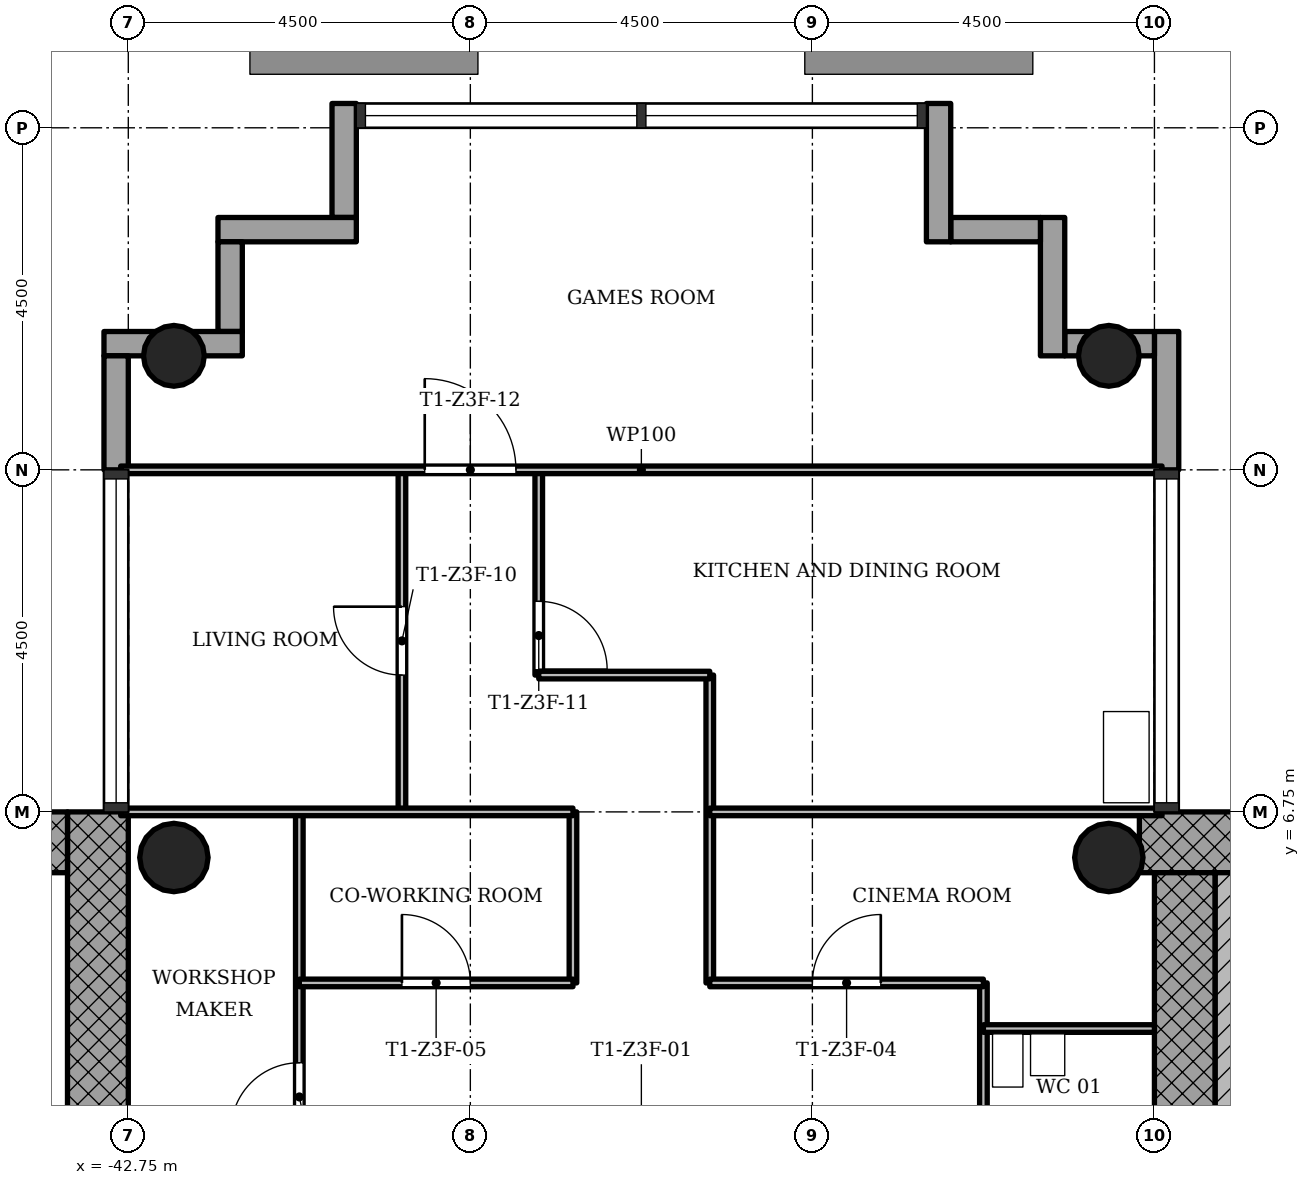
"""IFC4 building model, lengths in metres.
Left out: names, types, materials, properties, quantities, classifications, styles, units other than length and angle.
Written with IfcOpenShell. Run it as: python <this file> out.ifc"""

import sys

from ifc_helpers import new_model, si_unit, direction, frame, frame_2d, origin, origin_2d, place, context, subcontext, project, spatial, rectangle, hollow_circle, extrude, element, fill, save


model = new_model("IFC4")
c1 = context("Model", 3, precision=1e-05, world=origin(), true_north=direction((0.0, 1.0)))
c2 = subcontext(c1, "Body", "Model", "MODEL_VIEW")
j1 = project(units=[si_unit("LENGTHUNIT", "METRE"), si_unit("PLANEANGLEUNIT", "RADIAN")], contexts=[c1])
p1 = place(None, origin())
s1 = spatial("IfcSite", under=j1, at=p1, CompositionType="ELEMENT")
p2 = place(p1, origin())
s2 = spatial("IfcBuilding", under=s1, at=p2, CompositionType="ELEMENT")
p3 = place(p2, frame((0.0, 0.0, 164.3)))
s3 = spatial("IfcBuildingStorey", under=s2, at=p3, CompositionType="ELEMENT", Elevation=164.3)
p4 = place(p3, frame((-20.652, 6.35, 0.0), z_axis=(0.0, 0.0, 1.0), x_axis=(-1.0, 0.0, 0.0)))
e1 = element("IfcWall", 1, at=p4, inside=s3, PredefinedType="SHEAR", context=c2, shape_type="SweptSolid", body=[
    extrude(rectangle(XDim=8.796, YDim=0.8, at=frame_2d((4.398, 0.0))), origin(), (0.0, 0.0, 1.0), 3.4),
])
p5 = place(p3, frame((-28.85, 5.95, 0.0), z_axis=(0.0, 0.0, 1.0), x_axis=(0.0, -1.0, 0.0)))
e2 = element("IfcWall", 2, at=p5, inside=s3, PredefinedType="SHEAR", context=c2, shape_type="SweptSolid", body=[
    extrude(rectangle(XDim=12.7, YDim=0.8, at=frame_2d((6.35, 0.0))), origin(), (0.0, 0.0, 1.0), 3.4),
])
p6 = place(p5, frame((5.05, 0.0, 0.0)))
e3 = element("IfcOpeningElement", 3, at=p6, cuts=e2, PredefinedType="OPENING", context=c2, shape_type="SweptSolid", body=[
    extrude(rectangle(XDim=1.8, YDim=2.1, at=frame_2d((0.9, 1.05))), frame((0.0, 0.41, 0.0), z_axis=(0.0, -1.0, 0.0), x_axis=(1.0, 0.0, 0.0)), (0.0, 0.0, 1.0), 0.82),
])
p7 = place(p3, frame((-43.15, -5.95, 0.0), z_axis=(0.0, 0.0, 1.0), x_axis=(0.0, 1.0, 0.0)))
e4 = element("IfcWall", 4, at=p7, inside=s3, PredefinedType="SHEAR", context=c2, shape_type="SweptSolid", body=[
    extrude(rectangle(XDim=12.7, YDim=0.8, at=frame_2d((6.35, 0.0))), origin(), (0.0, 0.0, 1.0), 3.4),
])
p8 = place(p7, frame((5.05, 0.0, 0.0)))
e5 = element("IfcOpeningElement", 5, at=p8, cuts=e4, PredefinedType="OPENING", context=c2, shape_type="SweptSolid", body=[
    extrude(rectangle(XDim=1.8, YDim=2.1, at=frame_2d((0.9, 1.05))), frame((0.0, 0.41, 0.0), z_axis=(0.0, -1.0, 0.0), x_axis=(1.0, 0.0, 0.0)), (0.0, 0.0, 1.0), 0.82),
])
p9 = place(p3, frame((-43.55, 6.35, 0.0), z_axis=(0.0, 0.0, 1.0), x_axis=(-1.0, 0.0, 0.0)))
e6 = element("IfcWall", 6, at=p9, inside=s3, PredefinedType="SHEAR", context=c2, shape_type="SweptSolid", body=[
    extrude(rectangle(XDim=8.2, YDim=0.8, at=frame_2d((4.1, 0.0))), origin(), (0.0, 0.0, 1.0), 3.4),
])
for number, where, z_axis, x_axis in (
    (7, (-29.85, 12.75, 0.0), (0.0, 0.0, 1.0), (1.0, 0.0, 0.0)),
    (8, (-42.15, 12.75, 0.0), (0.0, 0.0, 1.0), (1.0, 0.0, 0.0)),
):
    element("IfcColumn", number, at=place(p3, frame(where, z_axis=z_axis, x_axis=x_axis)), inside=s3, PredefinedType="COLUMN", context=c2, shape_type="SweptSolid", body=[
        extrude(hollow_circle(Radius=0.4, WallThickness=0.028, at=origin_2d()), origin(), (0.0, 0.0, 1.0), 3.4),
    ])
for number, where, z_axis, x_axis in (
    (9, (-29.85, 6.15, 0.0), (0.0, 0.0, 1.0), (1.0, 0.0, 0.0)),
    (10, (-42.15, 6.15, 0.0), (0.0, 0.0, 1.0), (1.0, 0.0, 0.0)),
):
    element("IfcColumn", number, at=place(p3, frame(where, z_axis=z_axis, x_axis=x_axis)), inside=s3, PredefinedType="COLUMN", context=c2, shape_type="SweptSolid", body=[
        extrude(hollow_circle(Radius=0.45, WallThickness=0.032, at=origin_2d()), origin(), (0.0, 0.0, 1.0), 3.4),
    ])
p10 = place(p3, frame((-29.09, 11.25, -0.3), z_axis=(0.0, 0.0, 1.0), x_axis=(0.0, 1.0, 0.0)))
e11 = element("IfcWall", 11, at=p10, inside=s3, PredefinedType="STANDARD", context=c2, shape_type="SweptSolid", body=[
    extrude(rectangle(XDim=1.82, YDim=0.32, at=frame_2d((0.91, 0.0))), origin(), (0.0, 0.0, 1.0), 3.4),
])
p11 = place(p3, frame((-29.25, 12.91, -0.3), z_axis=(0.0, 0.0, 1.0), x_axis=(-1.0, 0.0, 0.0)))
e12 = element("IfcWall", 12, at=p11, inside=s3, PredefinedType="STANDARD", context=c2, shape_type="SweptSolid", body=[
    extrude(rectangle(XDim=1.18, YDim=0.32, at=frame_2d((0.59, 0.0))), origin(), (0.0, 0.0, 1.0), 3.4),
])
p12 = place(p3, frame((-30.59, 12.75, -0.3), z_axis=(0.0, 0.0, 1.0), x_axis=(0.0, 1.0, 0.0)))
e13 = element("IfcWall", 13, at=p12, inside=s3, PredefinedType="STANDARD", context=c2, shape_type="SweptSolid", body=[
    extrude(rectangle(XDim=1.82, YDim=0.32, at=frame_2d((0.91, 0.0))), origin(), (0.0, 0.0, 1.0), 3.4),
])
p13 = place(p3, frame((-30.75, 14.41, -0.3), z_axis=(0.0, 0.0, 1.0), x_axis=(-1.0, 0.0, 0.0)))
e14 = element("IfcWall", 14, at=p13, inside=s3, PredefinedType="STANDARD", context=c2, shape_type="SweptSolid", body=[
    extrude(rectangle(XDim=1.18, YDim=0.32, at=frame_2d((0.59, 0.0))), origin(), (0.0, 0.0, 1.0), 3.4),
])
p14 = place(p3, frame((-32.09, 14.25, -0.3), z_axis=(0.0, 0.0, 1.0), x_axis=(0.0, 1.0, 0.0)))
e15 = element("IfcWall", 15, at=p14, inside=s3, PredefinedType="STANDARD", context=c2, shape_type="SweptSolid", body=[
    extrude(rectangle(XDim=1.82, YDim=0.32, at=frame_2d((0.91, 0.0))), origin(), (0.0, 0.0, 1.0), 3.4),
])
p15 = place(p3, frame((-39.91, 16.07, -0.3), z_axis=(0.0, 0.0, 1.0), x_axis=(0.0, -1.0, 0.0)))
e16 = element("IfcWall", 16, at=p15, inside=s3, PredefinedType="STANDARD", context=c2, shape_type="SweptSolid", body=[
    extrude(rectangle(XDim=1.5, YDim=0.32, at=frame_2d((0.75, 0.0))), origin(), (0.0, 0.0, 1.0), 3.4),
])
p16 = place(p3, frame((-39.75, 14.41, -0.3), z_axis=(0.0, 0.0, 1.0), x_axis=(-1.0, 0.0, 0.0)))
e17 = element("IfcWall", 17, at=p16, inside=s3, PredefinedType="STANDARD", context=c2, shape_type="SweptSolid", body=[
    extrude(rectangle(XDim=1.82, YDim=0.32, at=frame_2d((0.91, 0.0))), origin(), (0.0, 0.0, 1.0), 3.4),
])
p17 = place(p3, frame((-41.41, 14.25, -0.3), z_axis=(0.0, 0.0, 1.0), x_axis=(0.0, -1.0, 0.0)))
e18 = element("IfcWall", 18, at=p17, inside=s3, PredefinedType="STANDARD", context=c2, shape_type="SweptSolid", body=[
    extrude(rectangle(XDim=1.18, YDim=0.32, at=frame_2d((0.59, 0.0))), origin(), (0.0, 0.0, 1.0), 3.4),
])
p18 = place(p3, frame((-41.25, 12.91, -0.3), z_axis=(0.0, 0.0, 1.0), x_axis=(-1.0, 0.0, 0.0)))
e19 = element("IfcWall", 19, at=p18, inside=s3, PredefinedType="STANDARD", context=c2, shape_type="SweptSolid", body=[
    extrude(rectangle(XDim=1.82, YDim=0.32, at=frame_2d((0.91, 0.0))), origin(), (0.0, 0.0, 1.0), 3.4),
])
p19 = place(p3, frame((-42.91, 12.75, -0.3), z_axis=(0.0, 0.0, 1.0), x_axis=(0.0, -1.0, 0.0)))
e20 = element("IfcWall", 20, at=p19, inside=s3, PredefinedType="STANDARD", context=c2, shape_type="SweptSolid", body=[
    extrude(rectangle(XDim=1.5, YDim=0.32, at=frame_2d((0.75, 0.0))), origin(), (0.0, 0.0, 1.0), 3.4),
])
p20 = place(p3, frame((-40.5, 1.5, 0.0), z_axis=(0.0, 0.0, 1.0), x_axis=(0.0, 1.0, 0.0)))
e21 = element("IfcWall", 21, at=p20, inside=s3, PredefinedType="PARTITIONING", context=c2, shape_type="SweptSolid", body=[
    extrude(rectangle(XDim=5.25, YDim=0.1, at=frame_2d((2.625, 0.0))), origin(), (0.0, 0.0, 1.0), 3.0),
])
p21 = place(p20, frame((1.05, 0.0, 0.0)))
e22 = element("IfcOpeningElement", 22, at=p21, cuts=e21, PredefinedType="OPENING", context=c2, shape_type="SweptSolid", body=[
    extrude(rectangle(XDim=0.9, YDim=2.1, at=frame_2d((0.45, 1.05))), frame((0.0, 0.06, 0.0), z_axis=(0.0, -1.0, 0.0), x_axis=(1.0, 0.0, 0.0)), (0.0, 0.0, 1.0), 0.12),
])
p22 = place(p3, frame((-39.15, 6.75, 0.0), z_axis=(0.0, 0.0, 1.0), x_axis=(0.0, 1.0, 0.0)))
e23 = element("IfcWall", 23, at=p22, inside=s3, PredefinedType="PARTITIONING", context=c2, shape_type="SweptSolid", body=[
    extrude(rectangle(XDim=4.5, YDim=0.1, at=frame_2d((2.25, 0.0))), origin(), (0.0, 0.0, 1.0), 3.0),
])
p23 = place(p22, frame((1.8, 0.0, 0.0)))
e24 = element("IfcOpeningElement", 24, at=p23, cuts=e23, PredefinedType="OPENING", context=c2, shape_type="SweptSolid", body=[
    extrude(rectangle(XDim=0.9, YDim=2.1, at=frame_2d((0.45, 1.05))), frame((0.0, 0.06, 0.0), z_axis=(0.0, -1.0, 0.0), x_axis=(1.0, 0.0, 0.0)), (0.0, 0.0, 1.0), 0.12),
])
p24 = place(p3, frame((-37.35, 8.55, 0.0), z_axis=(0.0, 0.0, 1.0), x_axis=(0.0, 1.0, 0.0)))
e25 = element("IfcWall", 25, at=p24, inside=s3, PredefinedType="PARTITIONING", context=c2, shape_type="SweptSolid", body=[
    extrude(rectangle(XDim=2.7, YDim=0.1, at=frame_2d((1.35, 0.0))), origin(), (0.0, 0.0, 1.0), 3.0),
])
p25 = place(p24, frame((0.07, 0.0, 0.0)))
e26 = element("IfcOpeningElement", 26, at=p25, cuts=e25, PredefinedType="OPENING", context=c2, shape_type="SweptSolid", body=[
    extrude(rectangle(XDim=0.9, YDim=2.1, at=frame_2d((0.45, 1.05))), frame((0.0, 0.06, 0.0), z_axis=(0.0, -1.0, 0.0), x_axis=(1.0, 0.0, 0.0)), (0.0, 0.0, 1.0), 0.12),
])
p26 = place(p3, frame((-36.9, 4.5, 0.0), z_axis=(0.0, 0.0, 1.0), x_axis=(0.0, 1.0, 0.0)))
e27 = element("IfcWall", 27, at=p26, inside=s3, PredefinedType="PARTITIONING", context=c2, shape_type="SweptSolid", body=[
    extrude(rectangle(XDim=2.25, YDim=0.1, at=frame_2d((1.125, 0.0))), origin(), (0.0, 0.0, 1.0), 3.0),
])
p27 = place(p3, frame((-35.1, 4.5, 0.0), z_axis=(0.0, 0.0, 1.0), x_axis=(0.0, 1.0, 0.0)))
e28 = element("IfcWall", 28, at=p27, inside=s3, PredefinedType="PARTITIONING", context=c2, shape_type="SweptSolid", body=[
    extrude(rectangle(XDim=4.05, YDim=0.1, at=frame_2d((2.025, 0.0))), origin(), (0.0, 0.0, 1.0), 3.0),
])
p28 = place(p3, frame((-31.5, 1.5, 0.0), z_axis=(0.0, 0.0, 1.0), x_axis=(0.0, 1.0, 0.0)))
e29 = element("IfcWall", 29, at=p28, inside=s3, PredefinedType="PARTITIONING", context=c2, shape_type="SweptSolid", body=[
    extrude(rectangle(XDim=3.0, YDim=0.1, at=frame_2d((1.5, 0.0))), origin(), (0.0, 0.0, 1.0), 3.0),
])
p29 = place(p3, frame((-31.5, 3.9, 0.0), z_axis=(0.0, 0.0, 1.0), x_axis=(1.0, 0.0, 0.0)))
e30 = element("IfcWall", 30, at=p29, inside=s3, PredefinedType="PARTITIONING", context=c2, shape_type="SweptSolid", body=[
    extrude(rectangle(XDim=2.25, YDim=0.1, at=frame_2d((1.125, 0.0))), origin(), (0.0, 0.0, 1.0), 3.0),
])
p30 = place(p3, frame((-40.5, 4.5, 0.0), z_axis=(0.0, 0.0, 1.0), x_axis=(1.0, 0.0, 0.0)))
e31 = element("IfcWall", 31, at=p30, inside=s3, PredefinedType="PARTITIONING", context=c2, shape_type="SweptSolid", body=[
    extrude(rectangle(XDim=3.6, YDim=0.1, at=frame_2d((1.8, 0.0))), origin(), (0.0, 0.0, 1.0), 3.0),
])
p31 = place(p30, frame((1.35, 0.0, 0.0)))
e32 = element("IfcOpeningElement", 32, at=p31, cuts=e31, PredefinedType="OPENING", context=c2, shape_type="SweptSolid", body=[
    extrude(rectangle(XDim=0.9, YDim=2.1, at=frame_2d((0.45, 1.05))), frame((0.0, 0.06, 0.0), z_axis=(0.0, -1.0, 0.0), x_axis=(1.0, 0.0, 0.0)), (0.0, 0.0, 1.0), 0.12),
])
p32 = place(p3, frame((-35.1, 4.5, 0.0), z_axis=(0.0, 0.0, 1.0), x_axis=(1.0, 0.0, 0.0)))
e33 = element("IfcWall", 33, at=p32, inside=s3, PredefinedType="PARTITIONING", context=c2, shape_type="SweptSolid", body=[
    extrude(rectangle(XDim=3.6, YDim=0.1, at=frame_2d((1.8, 0.0))), origin(), (0.0, 0.0, 1.0), 3.0),
])
p33 = place(p32, frame((1.35, 0.0, 0.0)))
e34 = element("IfcOpeningElement", 34, at=p33, cuts=e33, PredefinedType="OPENING", context=c2, shape_type="SweptSolid", body=[
    extrude(rectangle(XDim=0.9, YDim=2.1, at=frame_2d((0.45, 1.05))), frame((0.0, 0.06, 0.0), z_axis=(0.0, -1.0, 0.0), x_axis=(1.0, 0.0, 0.0)), (0.0, 0.0, 1.0), 0.12),
])
for number, where, z_axis, x_axis in (
    (35, (-42.85, 6.75, 0.0), (0.0, 0.0, 1.0), (1.0, 0.0, 0.0)),
    (36, (-35.1, 6.75, 0.0), (0.0, 0.0, 1.0), (1.0, 0.0, 0.0)),
):
    element("IfcWall", number, at=place(p3, frame(where, z_axis=z_axis, x_axis=x_axis)), inside=s3, PredefinedType="PARTITIONING", context=c2, shape_type="SweptSolid", body=[
        extrude(rectangle(XDim=5.95, YDim=0.1, at=frame_2d((2.975, 0.0))), origin(), (0.0, 0.0, 1.0), 3.0),
    ])
p34 = place(p3, frame((-37.35, 8.55, 0.0), z_axis=(0.0, 0.0, 1.0), x_axis=(1.0, 0.0, 0.0)))
e37 = element("IfcWall", 37, at=p34, inside=s3, PredefinedType="PARTITIONING", context=c2, shape_type="SweptSolid", body=[
    extrude(rectangle(XDim=2.25, YDim=0.1, at=frame_2d((1.125, 0.0))), origin(), (0.0, 0.0, 1.0), 3.0),
])
p35 = place(p3, frame((-42.85, 11.25, 0.0), z_axis=(0.0, 0.0, 1.0), x_axis=(1.0, 0.0, 0.0)))
e38 = element("IfcWall", 38, at=p35, inside=s3, PredefinedType="PARTITIONING", context=c2, shape_type="SweptSolid", body=[
    extrude(rectangle(XDim=13.7, YDim=0.1, at=frame_2d((6.85, 0.0))), origin(), (0.0, 0.0, 1.0), 3.0),
])
p36 = place(p35, frame((4.0, 0.0, 0.0)))
e39 = element("IfcOpeningElement", 39, at=p36, cuts=e38, PredefinedType="OPENING", context=c2, shape_type="SweptSolid", body=[
    extrude(rectangle(XDim=1.2, YDim=2.1, at=frame_2d((0.6, 1.05))), frame((0.0, 0.06, 0.0), z_axis=(0.0, -1.0, 0.0), x_axis=(1.0, 0.0, 0.0)), (0.0, 0.0, 1.0), 0.12),
])
p37 = place(p3, frame((-28.25, 1.85, 0.0), z_axis=(0.0, 0.0, 1.0), x_axis=(0.0, 1.0, 0.0)))
e40 = element("IfcWall", 40, at=p37, inside=s3, PredefinedType="SHEAR", context=c2, shape_type="SweptSolid", body=[
    extrude(rectangle(XDim=4.1, YDim=0.4, at=frame_2d((2.05, 0.0))), origin(), (0.0, 0.0, 1.0), 3.4),
])
p38 = place(p33, origin())
e41 = element("IfcDoor", 41, at=p38, inside=s3, OperationType="SINGLE_SWING_LEFT", PredefinedType="DOOR", context=c2, shape_type="SweptSolid", body=[
    extrude(rectangle(XDim=0.9, YDim=2.1, at=frame_2d((0.45, 1.05))), frame((0.0, 0.025, 0.0), z_axis=(0.0, -1.0, 0.0), x_axis=(1.0, 0.0, 0.0)), (0.0, 0.0, 1.0), 0.05),
])
fill(e34, e41)
p39 = place(p31, origin())
e42 = element("IfcDoor", 42, at=p39, inside=s3, OperationType="SINGLE_SWING_RIGHT", PredefinedType="DOOR", context=c2, shape_type="SweptSolid", body=[
    extrude(rectangle(XDim=0.9, YDim=2.1, at=frame_2d((0.45, 1.05))), frame((0.0, 0.025, 0.0), z_axis=(0.0, -1.0, 0.0), x_axis=(1.0, 0.0, 0.0)), (0.0, 0.0, 1.0), 0.05),
])
fill(e32, e42)
p40 = place(p21, origin())
e43 = element("IfcDoor", 43, at=p40, inside=s3, OperationType="SINGLE_SWING_RIGHT", PredefinedType="DOOR", context=c2, shape_type="SweptSolid", body=[
    extrude(rectangle(XDim=0.9, YDim=2.1, at=frame_2d((0.45, 1.05))), frame((0.0, 0.025, 0.0), z_axis=(0.0, -1.0, 0.0), x_axis=(1.0, 0.0, 0.0)), (0.0, 0.0, 1.0), 0.05),
])
fill(e22, e43)
p41 = place(p23, origin())
e44 = element("IfcDoor", 44, at=p41, inside=s3, OperationType="SINGLE_SWING_LEFT", PredefinedType="DOOR", context=c2, shape_type="SweptSolid", body=[
    extrude(rectangle(XDim=0.9, YDim=2.1, at=frame_2d((0.45, 1.05))), frame((0.0, 0.025, 0.0), z_axis=(0.0, -1.0, 0.0), x_axis=(1.0, 0.0, 0.0)), (0.0, 0.0, 1.0), 0.05),
])
fill(e24, e44)
p42 = place(p25, origin())
e45 = element("IfcDoor", 45, at=p42, inside=s3, OperationType="SINGLE_SWING_LEFT", PredefinedType="DOOR", context=c2, shape_type="SweptSolid", body=[
    extrude(rectangle(XDim=0.9, YDim=2.1, at=frame_2d((0.45, 1.05))), frame((0.0, 0.025, 0.0), z_axis=(0.0, -1.0, 0.0), x_axis=(1.0, 0.0, 0.0)), (0.0, 0.0, 1.0), 0.05),
])
fill(e26, e45)
p43 = place(p36, origin())
e46 = element("IfcDoor", 46, at=p43, inside=s3, OperationType="SINGLE_SWING_RIGHT", PredefinedType="DOOR", context=c2, shape_type="SweptSolid", body=[
    extrude(rectangle(XDim=1.2, YDim=2.1, at=frame_2d((0.6, 1.05))), frame((0.0, 0.025, 0.0), z_axis=(0.0, -1.0, 0.0), x_axis=(1.0, 0.0, 0.0)), (0.0, 0.0, 1.0), 0.05),
])
fill(e39, e46)
save(model, sys.argv[1])
